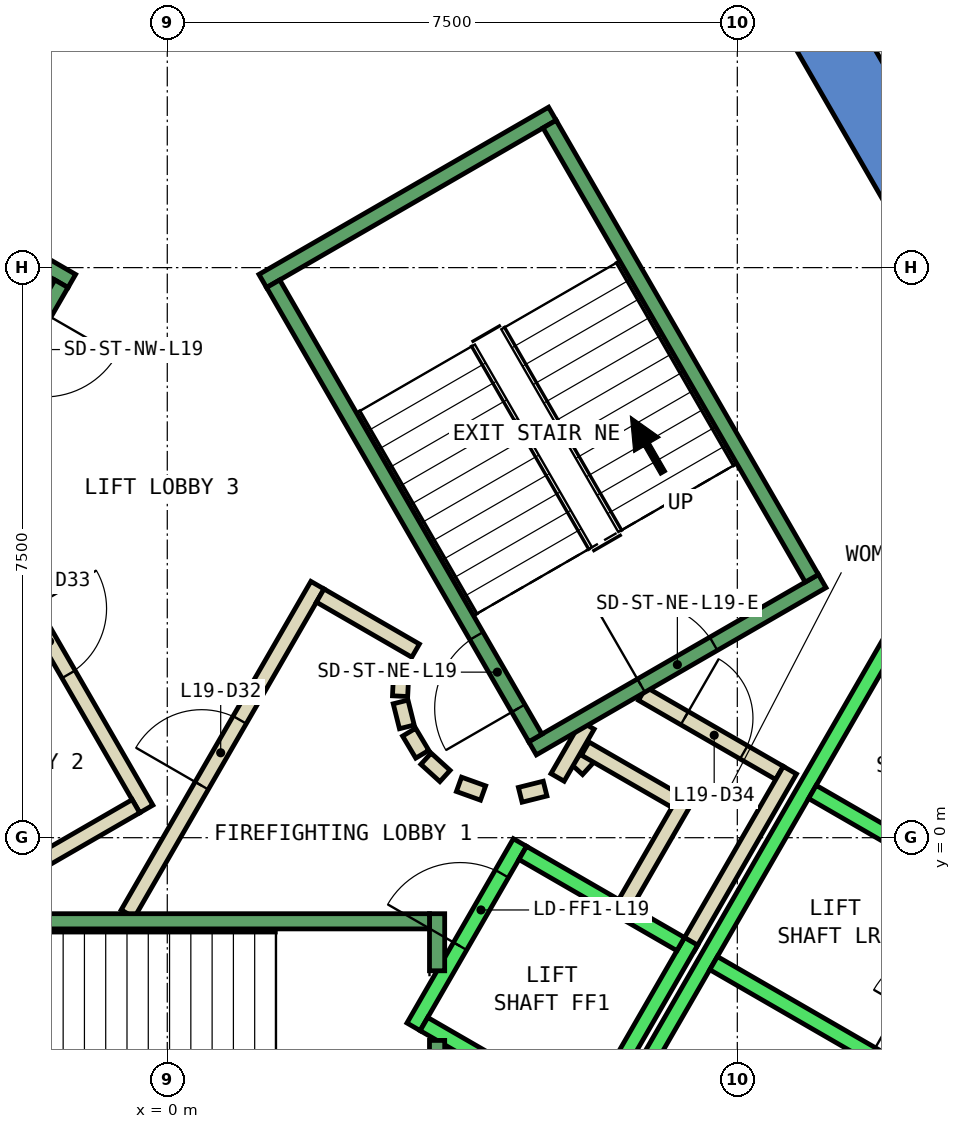
"""IFC4 building model, lengths in metres.
Left out: names, types, materials, properties, quantities, classifications, styles, units other than length and angle.
Written with IfcOpenShell. Run it as: python <this file> out.ifc"""

import sys

from ifc_helpers import new_model, si_unit, direction, frame, frame_2d, origin, place, context, subcontext, project, spatial, polyline, rectangle, outline, extrude, element, fill, save


model = new_model("IFC4")
c1 = context("Model", 3, precision=1e-05, world=origin(), true_north=direction((0.0, 1.0)))
c2 = subcontext(c1, "Body", "Model", "MODEL_VIEW")
j1 = project(units=[si_unit("LENGTHUNIT", "METRE"), si_unit("PLANEANGLEUNIT", "RADIAN")], contexts=[c1])
p1 = place(None, origin())
s1 = spatial("IfcSite", under=j1, at=p1, CompositionType="ELEMENT")
p2 = place(p1, origin())
s2 = spatial("IfcBuilding", under=s1, at=p2, CompositionType="ELEMENT")
p3 = place(p2, frame((0.0, 0.0, 90.8)))
s3 = spatial("IfcBuildingStorey", under=s2, at=p3, CompositionType="ELEMENT", Elevation=90.8)
p4 = place(p3, frame((0.0, 0.0, -0.4)))
e1 = element("IfcWall", 1, at=p4, inside=s3, PredefinedType="SHEAR", context=c2, shape_type="SweptSolid", body=[
    extrude(outline(polyline([(8.517, 11.748), (7.738, 11.298), (12.817, 2.5), (13.856, 2.5), (8.517, 11.748)])), origin(), (0.0, 0.0, 1.0), 4.2),
])
p5 = place(p3, frame((0.0, 0.0, -0.4)))
e2 = element("IfcWall", 2, at=p5, inside=s3, PredefinedType="SHEAR", context=c2, shape_type="SweptSolid", body=[
    extrude(outline(polyline([(10.717, -2.937), (9.938, -2.487), (9.288, -3.613), (10.067, -4.063), (10.717, -2.937)])), origin(), (0.0, 0.0, 1.0), 4.2),
])
p6 = place(p3, frame((5.39, 0.898, 0.0), z_axis=(0.0, 0.0, 1.0), x_axis=(0.673828488714, 0.738887791073, 0.0)))
e3 = element("IfcWall", 3, at=p6, inside=s3, PredefinedType="PARTITIONING", context=c2, shape_type="SweptSolid", body=[
    extrude(rectangle(XDim=0.263, YDim=0.2, at=frame_2d((0.131, 0.0))), origin(), (0.0, 0.0, 1.0), 3.8),
])
p7 = place(p3, frame((5.499, 1.172, 0.0), z_axis=(0.0, 0.0, 1.0), x_axis=(0.866333505267, -0.499465972466, 0.0)))
e4 = element("IfcWall", 4, at=p7, inside=s3, PredefinedType="PARTITIONING", context=c2, shape_type="SweptSolid", body=[
    extrude(rectangle(XDim=1.374, YDim=0.2, at=frame_2d((0.687, 0.0))), origin(), (0.0, 0.0, 1.0), 3.8),
])
p8 = place(p3, frame((6.826, 0.522, 0.0), z_axis=(0.0, 0.0, 1.0), x_axis=(-0.500016722714, -0.866015748706, 0.0)))
e5 = element("IfcWall", 5, at=p8, inside=s3, PredefinedType="PARTITIONING", context=c2, shape_type="SweptSolid", body=[
    extrude(rectangle(XDim=1.7, YDim=0.2, at=frame_2d((0.85, 0.0))), origin(), (0.0, 0.0, 1.0), 3.8),
])
p9 = place(p3, frame((6.25, 1.894, 0.0), z_axis=(0.0, 0.0, 1.0), x_axis=(0.866043184279, -0.499969202016, 0.0)))
e6 = element("IfcWall", 6, at=p9, inside=s3, PredefinedType="PARTITIONING", context=c2, shape_type="SweptSolid", body=[
    extrude(rectangle(XDim=2.084, YDim=0.2, at=frame_2d((1.042, 0.0))), origin(), (0.0, 0.0, 1.0), 3.8),
])
p10 = place(p9, frame((0.642, 0.0, 0.0)))
e7 = element("IfcOpeningElement", 7, at=p10, cuts=e6, PredefinedType="OPENING", context=c2, shape_type="SweptSolid", body=[
    extrude(rectangle(XDim=0.9, YDim=2.1, at=frame_2d((0.45, 1.05))), frame((0.0, 0.11, 0.0), z_axis=(0.0, -1.0, 0.0), x_axis=(1.0, 0.0, 0.0)), (0.0, 0.0, 1.0), 0.22),
])
p11 = place(p3, frame((8.192, 0.888, 0.0), z_axis=(0.0, 0.0, 1.0), x_axis=(-0.499940625693, -0.866059680843, 0.0)))
e8 = element("IfcWall", 8, at=p11, inside=s3, PredefinedType="PARTITIONING", context=c2, shape_type="SweptSolid", body=[
    extrude(rectangle(XDim=2.68, YDim=0.2, at=frame_2d((1.34, 0.0))), origin(), (0.0, 0.0, 1.0), 3.8),
])
p12 = place(p3, frame((5.135, 0.793, 0.0), z_axis=(0.0, 0.0, 1.0), x_axis=(0.499526442893, 0.866298639529, 0.0)))
e9 = element("IfcWall", 9, at=p12, inside=s3, PredefinedType="PARTITIONING", context=c2, shape_type="SweptSolid", body=[
    extrude(rectangle(XDim=0.791, YDim=0.2, at=frame_2d((0.396, 0.0))), origin(), (0.0, 0.0, 1.0), 3.8),
])
p13 = place(p3, frame((-0.52, -1.0, 0.0), z_axis=(0.0, 0.0, 1.0), x_axis=(0.50011622646, 0.865958290007, 0.0)))
e10 = element("IfcWall", 10, at=p13, inside=s3, PredefinedType="PARTITIONING", context=c2, shape_type="SweptSolid", body=[
    extrude(rectangle(XDim=4.991, YDim=0.2, at=frame_2d((2.496, 0.0))), origin(), (0.0, 0.0, 1.0), 3.8),
])
p14 = place(p13, frame((1.945, 0.0, 0.0)))
e11 = element("IfcOpeningElement", 11, at=p14, cuts=e10, PredefinedType="OPENING", context=c2, shape_type="SweptSolid", body=[
    extrude(rectangle(XDim=1.0, YDim=2.1, at=frame_2d((0.5, 1.05))), frame((0.0, 0.11, 0.0), z_axis=(0.0, -1.0, 0.0), x_axis=(1.0, 0.0, 0.0)), (0.0, 0.0, 1.0), 0.22),
])
p15 = place(p3, frame((2.012, 3.186, 0.0), z_axis=(0.0, 0.0, 1.0), x_axis=(0.865891012941, -0.500232699559, 0.0)))
e12 = element("IfcWall", 12, at=p15, inside=s3, PredefinedType="PARTITIONING", context=c2, shape_type="SweptSolid", body=[
    extrude(rectangle(XDim=1.449, YDim=0.2, at=frame_2d((0.725, 0.0))), origin(), (0.0, 0.0, 1.0), 3.8),
])
p16 = place(p3, frame((3.079, 2.199, 0.0), z_axis=(0.0, 0.0, 1.0), x_axis=(-0.047771483479, -0.998858290933, 0.0)))
e13 = element("IfcWall", 13, at=p16, inside=s3, PredefinedType="PARTITIONING", context=c2, shape_type="SweptSolid", body=[
    extrude(rectangle(XDim=0.337, YDim=0.2, at=frame_2d((0.169, 0.0))), origin(), (0.0, 0.0, 1.0), 3.8),
])
p17 = place(p3, frame((3.07, 1.786, 0.0), z_axis=(0.0, 0.0, 1.0), x_axis=(0.242705583207, -0.970099994784, 0.0)))
e14 = element("IfcWall", 14, at=p17, inside=s3, PredefinedType="PARTITIONING", context=c2, shape_type="SweptSolid", body=[
    extrude(rectangle(XDim=0.338, YDim=0.2, at=frame_2d((0.169, 0.0))), origin(), (0.0, 0.0, 1.0), 3.8),
])
for number, where, z_axis, x_axis in (
    (15, (3.182, 1.388, 0.0), (0.0, 0.0, 1.0), (0.512, -0.859, 0.0)),
    (16, (3.404, 1.039, 0.0), (0.0, 0.0, 1.0), (0.74, -0.672, 0.0)),
):
    element("IfcWall", number, at=place(p3, frame(where, z_axis=z_axis, x_axis=x_axis)), inside=s3, PredefinedType="PARTITIONING", context=c2, shape_type="SweptSolid", body=[
        extrude(rectangle(XDim=0.338, YDim=0.2, at=frame_2d((0.169, 0.0))), origin(), (0.0, 0.0, 1.0), 3.8),
    ])
p18 = place(p3, frame((3.838, 0.702, 0.0), z_axis=(0.0, 0.0, 1.0), x_axis=(0.941035081519, -0.338308993895, 0.0)))
e17 = element("IfcWall", 17, at=p18, inside=s3, PredefinedType="PARTITIONING", context=c2, shape_type="SweptSolid", body=[
    extrude(rectangle(XDim=0.337, YDim=0.2, at=frame_2d((0.168, 0.0))), origin(), (0.0, 0.0, 1.0), 3.8),
])
p19 = place(p3, frame((4.644, 0.564, 0.0), z_axis=(0.0, 0.0, 1.0), x_axis=(0.969929076366, 0.243387729394, 0.0)))
e18 = element("IfcWall", 18, at=p19, inside=s3, PredefinedType="PARTITIONING", context=c2, shape_type="SweptSolid", body=[
    extrude(rectangle(XDim=0.337, YDim=0.2, at=frame_2d((0.168, 0.0))), origin(), (0.0, 0.0, 1.0), 3.8),
])
p20 = place(p3, frame((-2.771, 4.7, 0.0), z_axis=(0.0, 0.0, 1.0), x_axis=(0.499969479948, -0.866043023828, 0.0)))
e19 = element("IfcWall", 19, at=p20, inside=s3, PredefinedType="PARTITIONING", context=c2, shape_type="SweptSolid", body=[
    extrude(rectangle(XDim=4.99, YDim=0.2, at=frame_2d((2.495, 0.0))), origin(), (0.0, 0.0, 1.0), 3.8),
])
p21 = place(p20, frame((1.945, 0.0, 0.0)))
e20 = element("IfcOpeningElement", 20, at=p21, cuts=e19, PredefinedType="OPENING", context=c2, shape_type="SweptSolid", body=[
    extrude(rectangle(XDim=1.0, YDim=2.1, at=frame_2d((0.5, 1.05))), frame((0.0, 0.11, 0.0), z_axis=(0.0, -1.0, 0.0), x_axis=(1.0, 0.0, 0.0)), (0.0, 0.0, 1.0), 0.22),
])
p22 = place(p3, frame((-0.412, 0.414, 0.0), z_axis=(0.0, 0.0, 1.0), x_axis=(-0.866017369001, -0.500013916395, 0.0)))
e21 = element("IfcWall", 21, at=p22, inside=s3, PredefinedType="PARTITIONING", context=c2, shape_type="SweptSolid", body=[
    extrude(rectangle(XDim=1.45, YDim=0.2, at=frame_2d((0.725, 0.0))), origin(), (0.0, 0.0, 1.0), 3.8),
])
p23 = place(p3, frame((3.24, -2.488, 0.0), z_axis=(0.0, 0.0, 1.0), x_axis=(0.49994636267, 0.866056369097, 0.0)))
e22 = element("IfcWall", 22, at=p23, inside=s3, PredefinedType="STANDARD", context=c2, shape_type="SweptSolid", body=[
    extrude(rectangle(XDim=2.8, YDim=0.2, at=frame_2d((1.4, 0.0))), origin(), (0.0, 0.0, 1.0), 3.8),
])
p24 = place(p23, frame((1.225, 0.0, 0.0)))
e23 = element("IfcOpeningElement", 23, at=p24, cuts=e22, PredefinedType="OPENING", context=c2, shape_type="SweptSolid", body=[
    extrude(rectangle(XDim=1.1, YDim=2.1, at=frame_2d((0.55, 1.05))), frame((0.0, 0.11, 0.0), z_axis=(0.0, -1.0, 0.0), x_axis=(1.0, 0.0, 0.0)), (0.0, 0.0, 1.0), 0.22),
])
p25 = place(p3, frame((5.492, -3.788, 0.0), z_axis=(0.0, 0.0, 1.0), x_axis=(0.500011755427, 0.866018616679, 0.0)))
e24 = element("IfcWall", 24, at=p25, inside=s3, PredefinedType="STANDARD", context=c2, shape_type="SweptSolid", body=[
    extrude(rectangle(XDim=2.8, YDim=0.2, at=frame_2d((1.4, 0.0))), origin(), (0.0, 0.0, 1.0), 3.8),
])
p26 = place(p3, frame((3.377, -2.452, 0.0), z_axis=(0.0, 0.0, 1.0), x_axis=(0.865955154139, -0.50012165622, 0.0)))
e25 = element("IfcWall", 25, at=p26, inside=s3, PredefinedType="STANDARD", context=c2, shape_type="SweptSolid", body=[
    extrude(rectangle(XDim=2.4, YDim=0.2, at=frame_2d((1.2, 0.0))), origin(), (0.0, 0.0, 1.0), 3.8),
])
p27 = place(p3, frame((4.677, -0.2, 0.0), z_axis=(0.0, 0.0, 1.0), x_axis=(0.865973769406, -0.500089422704, 0.0)))
e26 = element("IfcWall", 26, at=p27, inside=s3, PredefinedType="STANDARD", context=c2, shape_type="SweptSolid", body=[
    extrude(rectangle(XDim=2.399, YDim=0.2, at=frame_2d((1.2, 0.0))), origin(), (0.0, 0.0, 1.0), 3.8),
])
p28 = place(p3, frame((4.451, -6.19, 0.0), z_axis=(0.0, 0.0, 1.0), x_axis=(0.50000090737, 0.866024879913, 0.0)))
e27 = element("IfcWall", 27, at=p28, inside=s3, PredefinedType="STANDARD", context=c2, shape_type="SweptSolid", body=[
    extrude(rectangle(XDim=10.6, YDim=0.2, at=frame_2d((5.3, 0.0))), origin(), (0.0, 0.0, 1.0), 3.8),
])
for number, where, z_axis, x_axis in (
    (28, (7.188, -1.65, 0.0), (0.0, 0.0, 1.0), (0.866, -0.5, 0.0)),
    (29, (8.488, 0.602, 0.0), (0.0, 0.0, 1.0), (0.866, -0.5, 0.0)),
):
    element("IfcWall", number, at=place(p3, frame(where, z_axis=z_axis, x_axis=x_axis)), inside=s3, PredefinedType="STANDARD", context=c2, shape_type="SweptSolid", body=[
        extrude(rectangle(XDim=2.5, YDim=0.2, at=frame_2d((1.25, 0.0))), origin(), (0.0, 0.0, 1.0), 3.8),
    ])
p29 = place(p3, frame((3.55, -2.667, 0.0), z_axis=(0.0, 0.0, 1.0), x_axis=(0.0, -1.0, 0.0)))
e30 = element("IfcWall", 30, at=p29, inside=s3, PredefinedType="STANDARD", context=c2, shape_type="SweptSolid", body=[
    extrude(rectangle(XDim=2.733, YDim=0.2, at=frame_2d((1.366, 0.0))), origin(), (0.0, 0.0, 1.0), 3.8),
])
p30 = place(p3, frame((3.55, -1.0, 0.0), z_axis=(0.0, 0.0, 1.0), x_axis=(0.0, -1.0, 0.0)))
e31 = element("IfcWall", 31, at=p30, inside=s3, PredefinedType="STANDARD", context=c2, shape_type="SweptSolid", body=[
    extrude(rectangle(XDim=0.751, YDim=0.2, at=frame_2d((0.375, 0.0))), origin(), (0.0, 0.0, 1.0), 3.8),
])
p31 = place(p3, frame((-3.45, -1.1, 0.0), z_axis=(0.0, 0.0, 1.0), x_axis=(1.0, 0.0, 0.0)))
e32 = element("IfcWall", 32, at=p31, inside=s3, PredefinedType="STANDARD", context=c2, shape_type="SweptSolid", body=[
    extrude(rectangle(XDim=6.9, YDim=0.2, at=frame_2d((3.45, 0.0))), origin(), (0.0, 0.0, 1.0), 3.8),
])
p32 = place(p31, frame((0.45, 0.0, 0.0)))
e33 = element("IfcOpeningElement", 33, at=p32, cuts=e32, PredefinedType="OPENING", context=c2, shape_type="SweptSolid", body=[
    extrude(rectangle(XDim=1.1, YDim=2.2, at=frame_2d((0.55, 1.1))), frame((0.0, 0.11, 0.0), z_axis=(0.0, -1.0, 0.0), x_axis=(1.0, 0.0, 0.0)), (0.0, 0.0, 1.0), 0.22),
])
p33 = place(p3, frame((4.806, 1.176, 0.0), z_axis=(0.0, 0.0, 1.0), x_axis=(0.866059941101, 0.499940174841, 0.0)))
e34 = element("IfcWall", 34, at=p33, inside=s3, PredefinedType="STANDARD", context=c2, shape_type="SweptSolid", body=[
    extrude(rectangle(XDim=4.4, YDim=0.2, at=frame_2d((2.2, 0.0))), origin(), (0.0, 0.0, 1.0), 3.8),
])
p34 = place(p33, frame((1.65, 0.0, 0.0)))
e35 = element("IfcOpeningElement", 35, at=p34, cuts=e34, PredefinedType="OPENING", context=c2, shape_type="SweptSolid", body=[
    extrude(rectangle(XDim=1.1, YDim=2.2, at=frame_2d((0.55, 1.1))), frame((0.0, 0.11, 0.0), z_axis=(0.0, -1.0, 0.0), x_axis=(1.0, 0.0, 0.0)), (0.0, 0.0, 1.0), 0.22),
])
p35 = place(p3, frame((1.256, 7.324, 0.0), z_axis=(0.0, 0.0, 1.0), x_axis=(0.866046073146, 0.499964197906, 0.0)))
e36 = element("IfcWall", 36, at=p35, inside=s3, PredefinedType="STANDARD", context=c2, shape_type="SweptSolid", body=[
    extrude(rectangle(XDim=4.4, YDim=0.2, at=frame_2d((2.2, 0.0))), origin(), (0.0, 0.0, 1.0), 3.8),
])
p36 = place(p3, frame((4.843, 1.312, 0.0), z_axis=(0.0, 0.0, 1.0), x_axis=(-0.499963383562, 0.866046543262, 0.0)))
e37 = element("IfcWall", 37, at=p36, inside=s3, PredefinedType="STANDARD", context=c2, shape_type="SweptSolid", body=[
    extrude(rectangle(XDim=6.9, YDim=0.2, at=frame_2d((3.45, 0.0))), origin(), (0.0, 0.0, 1.0), 3.8),
])
p37 = place(p36, frame((0.45, 0.0, 0.0)))
e38 = element("IfcOpeningElement", 38, at=p37, cuts=e37, PredefinedType="OPENING", context=c2, shape_type="SweptSolid", body=[
    extrude(rectangle(XDim=1.1, YDim=2.2, at=frame_2d((0.55, 1.1))), frame((0.0, 0.11, 0.0), z_axis=(0.0, -1.0, 0.0), x_axis=(1.0, 0.0, 0.0)), (0.0, 0.0, 1.0), 0.22),
])
p38 = place(p3, frame((8.48, 3.412, 0.0), z_axis=(0.0, 0.0, 1.0), x_axis=(-0.499978703459, 0.866037698999, 0.0)))
e39 = element("IfcWall", 39, at=p38, inside=s3, PredefinedType="STANDARD", context=c2, shape_type="SweptSolid", body=[
    extrude(rectangle(XDim=6.9, YDim=0.2, at=frame_2d((3.45, 0.0))), origin(), (0.0, 0.0, 1.0), 3.8),
])
p39 = place(p3, frame((-1.256, 7.324, 0.0), z_axis=(0.0, 0.0, 1.0), x_axis=(-0.866046073146, 0.499964197906, 0.0)))
e40 = element("IfcWall", 40, at=p39, inside=s3, PredefinedType="STANDARD", context=c2, shape_type="SweptSolid", body=[
    extrude(rectangle(XDim=4.4, YDim=0.2, at=frame_2d((2.2, 0.0))), origin(), (0.0, 0.0, 1.0), 3.8),
])
p40 = place(p39, frame((1.65, 0.0, 0.0)))
e41 = element("IfcOpeningElement", 41, at=p40, cuts=e40, PredefinedType="OPENING", context=c2, shape_type="SweptSolid", body=[
    extrude(rectangle(XDim=1.1, YDim=2.2, at=frame_2d((0.55, 1.1))), frame((0.0, 0.11, 0.0), z_axis=(0.0, -1.0, 0.0), x_axis=(1.0, 0.0, 0.0)), (0.0, 0.0, 1.0), 0.22),
])
p41 = place(p3, frame((-1.393, 7.288, 0.0), z_axis=(0.0, 0.0, 1.0), x_axis=(-0.499963383562, -0.866046543262, 0.0)))
e42 = element("IfcWall", 42, at=p41, inside=s3, PredefinedType="STANDARD", context=c2, shape_type="SweptSolid", body=[
    extrude(rectangle(XDim=6.9, YDim=0.2, at=frame_2d((3.45, 0.0))), origin(), (0.0, 0.0, 1.0), 3.8),
])
p42 = place(p41, frame((0.45, 0.0, 0.0)))
e43 = element("IfcOpeningElement", 43, at=p42, cuts=e42, PredefinedType="OPENING", context=c2, shape_type="SweptSolid", body=[
    extrude(rectangle(XDim=1.1, YDim=2.2, at=frame_2d((0.55, 1.1))), frame((0.0, 0.11, 0.0), z_axis=(0.0, -1.0, 0.0), x_axis=(1.0, 0.0, 0.0)), (0.0, 0.0, 1.0), 0.22),
])
p43 = place(p14, origin())
e44 = element("IfcDoor", 44, at=p43, inside=s3, OperationType="SINGLE_SWING_LEFT", PredefinedType="DOOR", context=c2, shape_type="SweptSolid", body=[
    extrude(rectangle(XDim=1.0, YDim=2.1, at=frame_2d((0.5, 1.05))), frame((0.0, 0.025, 0.0), z_axis=(0.0, -1.0, 0.0), x_axis=(1.0, 0.0, 0.0)), (0.0, 0.0, 1.0), 0.05),
])
fill(e11, e44)
p44 = place(p21, origin())
e45 = element("IfcDoor", 45, at=p44, inside=s3, OperationType="SINGLE_SWING_RIGHT", PredefinedType="DOOR", context=c2, shape_type="SweptSolid", body=[
    extrude(rectangle(XDim=1.0, YDim=2.1, at=frame_2d((0.5, 1.05))), frame((0.0, 0.025, 0.0), z_axis=(0.0, -1.0, 0.0), x_axis=(1.0, 0.0, 0.0)), (0.0, 0.0, 1.0), 0.05),
])
fill(e20, e45)
p45 = place(p10, origin())
e46 = element("IfcDoor", 46, at=p45, inside=s3, OperationType="SINGLE_SWING_LEFT", PredefinedType="DOOR", context=c2, shape_type="SweptSolid", body=[
    extrude(rectangle(XDim=0.9, YDim=2.1, at=frame_2d((0.45, 1.05))), frame((0.0, 0.025, 0.0), z_axis=(0.0, -1.0, 0.0), x_axis=(1.0, 0.0, 0.0)), (0.0, 0.0, 1.0), 0.05),
])
fill(e7, e46)
p46 = place(p24, origin())
e47 = element("IfcDoor", 47, at=p46, inside=s3, OperationType="SLIDING_TO_LEFT", PredefinedType="DOOR", context=c2, shape_type="SweptSolid", body=[
    extrude(rectangle(XDim=1.1, YDim=2.1, at=frame_2d((0.55, 1.05))), frame((0.0, 0.025, 0.0), z_axis=(0.0, -1.0, 0.0), x_axis=(1.0, 0.0, 0.0)), (0.0, 0.0, 1.0), 0.05),
])
fill(e23, e47)
p47 = place(p37, origin())
e48 = element("IfcDoor", 48, at=p47, inside=s3, OperationType="SINGLE_SWING_LEFT", PredefinedType="DOOR", context=c2, shape_type="SweptSolid", body=[
    extrude(rectangle(XDim=1.1, YDim=2.2, at=frame_2d((0.55, 1.1))), frame((0.0, 0.025, 0.0), z_axis=(0.0, -1.0, 0.0), x_axis=(1.0, 0.0, 0.0)), (0.0, 0.0, 1.0), 0.05),
])
fill(e38, e48)
p48 = place(p34, origin())
e49 = element("IfcDoor", 49, at=p48, inside=s3, OperationType="SINGLE_SWING_LEFT", PredefinedType="DOOR", context=c2, shape_type="SweptSolid", body=[
    extrude(rectangle(XDim=1.1, YDim=2.2, at=frame_2d((0.55, 1.1))), frame((0.0, 0.025, 0.0), z_axis=(0.0, -1.0, 0.0), x_axis=(1.0, 0.0, 0.0)), (0.0, 0.0, 1.0), 0.05),
])
fill(e35, e49)
save(model, sys.argv[1])
